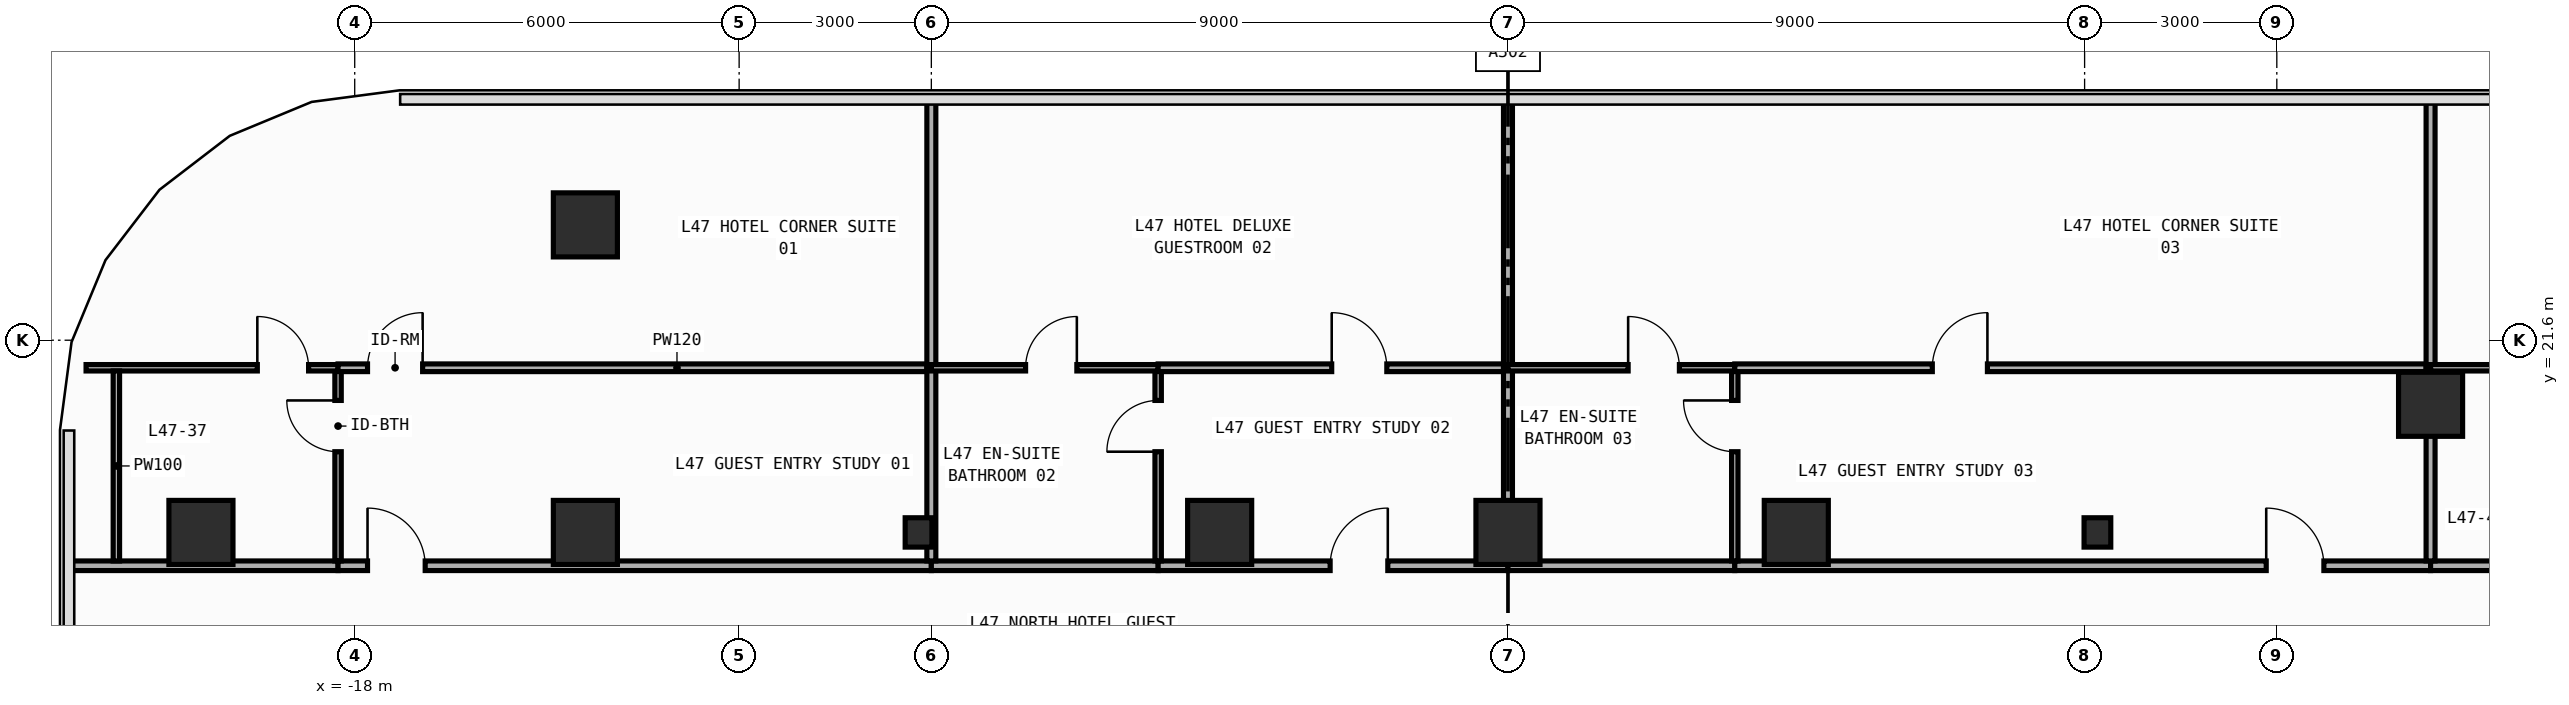
"""IFC4 building model, lengths in metres.
Left out: names, types, materials, properties, quantities, classifications, styles, units other than length and angle.
Written with IfcOpenShell. Run it as: python <this file> out.ifc"""

import sys

from ifc_helpers import new_model, si_unit, direction, frame, frame_2d, origin, origin_2d, place, context, subcontext, project, spatial, rectangle, i_section, extrude, element, fill, save


model = new_model("IFC4")
c1 = context("Model", 3, precision=1e-05, world=origin(), true_north=direction((0.0, 1.0)))
c2 = subcontext(c1, "Body", "Model", "MODEL_VIEW")
j1 = project(units=[si_unit("LENGTHUNIT", "METRE"), si_unit("PLANEANGLEUNIT", "RADIAN")], contexts=[c1])
p1 = place(None, origin())
s1 = spatial("IfcSite", under=j1, at=p1, CompositionType="ELEMENT")
p2 = place(p1, origin())
s2 = spatial("IfcBuilding", under=s1, at=p2, CompositionType="ELEMENT")
p3 = place(p2, frame((0.0, 0.0, 203.0)))
s3 = spatial("IfcBuildingStorey", under=s2, at=p3, CompositionType="ELEMENT", Elevation=203.0)
for number, where, z_axis, x_axis in (
    (1, (-9.2, 18.6, 0.0), (0.0, 0.0, 1.0), (1.0, 0.0, 0.0)),
    (2, (9.2, 18.6, 0.0), (0.0, 0.0, 1.0), (1.0, 0.0, 0.0)),
):
    element("IfcColumn", number, at=place(p3, frame(where, z_axis=z_axis, x_axis=x_axis)), inside=s3, PredefinedType="COLUMN", context=c2, shape_type="SweptSolid", body=[
        extrude(i_section(OverallWidth=0.417, OverallDepth=0.458, WebThickness=0.03, FlangeThickness=0.05, FilletRadius=0.022, at=origin_2d()), origin(), (0.0, 0.0, 1.0), 3.8),
    ])
for number, where, z_axis, x_axis in (
    (3, (-20.4, 18.6, 0.0), (0.0, 0.0, 1.0), (1.0, 0.0, 0.0)),
    (4, (-14.4, 18.6, 0.0), (0.0, 0.0, 1.0), (1.0, 0.0, 0.0)),
    (5, (-4.5, 18.6, 0.0), (0.0, 0.0, 1.0), (1.0, 0.0, 0.0)),
    (6, (0.0, 18.6, 0.0), (0.0, 0.0, 1.0), (1.0, 0.0, 0.0)),
    (7, (4.5, 18.6, 0.0), (0.0, 0.0, 1.0), (1.0, 0.0, 0.0)),
    (8, (-14.4, 23.4, 0.0), (0.0, 0.0, 1.0), (1.0, 0.0, 0.0)),
    (9, (14.4, 20.6, 0.0), (0.0, 0.0, 1.0), (1.0, 0.0, 0.0)),
):
    element("IfcColumn", number, at=place(p3, frame(where, z_axis=z_axis, x_axis=x_axis)), inside=s3, PredefinedType="COLUMN", context=c2, shape_type="SweptSolid", body=[
        extrude(rectangle(XDim=1.0, YDim=1.0, at=origin_2d()), origin(), (0.0, 0.0, 1.0), 3.8),
    ])
p4 = place(p3, frame((-22.455, 18.08, 0.0), z_axis=(0.0, 0.0, 1.0), x_axis=(1.0, 0.0, 0.0)))
e10 = element("IfcWall", 10, at=p4, inside=s3, PredefinedType="PARTITIONING", context=c2, shape_type="SweptSolid", body=[
    extrude(rectangle(XDim=4.195, YDim=0.15, at=frame_2d((2.098, 0.0))), origin(), (0.0, 0.0, 1.0), 3.54),
])
p5 = place(p3, frame((-18.26, 18.08, 0.0), z_axis=(0.0, 0.0, 1.0), x_axis=(1.0, 0.0, 0.0)))
e11 = element("IfcWall", 11, at=p5, inside=s3, PredefinedType="PARTITIONING", context=c2, shape_type="SweptSolid", body=[
    extrude(rectangle(XDim=9.26, YDim=0.15, at=frame_2d((4.63, 0.0))), origin(), (0.0, 0.0, 1.0), 3.54),
])
p6 = place(p5, frame((0.46, 0.0, 0.0)))
e12 = element("IfcOpeningElement", 12, at=p6, cuts=e11, PredefinedType="OPENING", context=c2, shape_type="SweptSolid", body=[
    extrude(rectangle(XDim=0.9, YDim=2.15, at=frame_2d((0.45, 1.075))), frame((0.0, 0.085, 0.0), z_axis=(0.0, -1.0, 0.0), x_axis=(1.0, 0.0, 0.0)), (0.0, 0.0, 1.0), 0.17),
])
p7 = place(p3, frame((-9.0, 18.08, 0.0), z_axis=(0.0, 0.0, 1.0), x_axis=(1.0, 0.0, 0.0)))
e13 = element("IfcWall", 13, at=p7, inside=s3, PredefinedType="PARTITIONING", context=c2, shape_type="SweptSolid", body=[
    extrude(rectangle(XDim=3.54, YDim=0.15, at=frame_2d((1.77, 0.0))), origin(), (0.0, 0.0, 1.0), 3.54),
])
p8 = place(p3, frame((-5.46, 18.08, 0.0), z_axis=(0.0, 0.0, 1.0), x_axis=(1.0, 0.0, 0.0)))
e14 = element("IfcWall", 14, at=p8, inside=s3, PredefinedType="PARTITIONING", context=c2, shape_type="SweptSolid", body=[
    extrude(rectangle(XDim=5.46, YDim=0.15, at=frame_2d((2.73, 0.0))), origin(), (0.0, 0.0, 1.0), 3.54),
])
p9 = place(p8, frame((2.684, 0.0, 0.0)))
e15 = element("IfcOpeningElement", 15, at=p9, cuts=e14, PredefinedType="OPENING", context=c2, shape_type="SweptSolid", body=[
    extrude(rectangle(XDim=0.9, YDim=2.15, at=frame_2d((0.45, 1.075))), frame((0.0, 0.085, 0.0), z_axis=(0.0, -1.0, 0.0), x_axis=(1.0, 0.0, 0.0)), (0.0, 0.0, 1.0), 0.17),
])
p10 = place(p3, frame((0.0, 18.08, 0.0), z_axis=(0.0, 0.0, 1.0), x_axis=(1.0, 0.0, 0.0)))
e16 = element("IfcWall", 16, at=p10, inside=s3, PredefinedType="PARTITIONING", context=c2, shape_type="SweptSolid", body=[
    extrude(rectangle(XDim=3.54, YDim=0.15, at=frame_2d((1.77, 0.0))), origin(), (0.0, 0.0, 1.0), 3.54),
])
p11 = place(p3, frame((3.54, 18.08, 0.0), z_axis=(0.0, 0.0, 1.0), x_axis=(1.0, 0.0, 0.0)))
e17 = element("IfcWall", 17, at=p11, inside=s3, PredefinedType="PARTITIONING", context=c2, shape_type="SweptSolid", body=[
    extrude(rectangle(XDim=10.86, YDim=0.15, at=frame_2d((5.43, 0.0))), origin(), (0.0, 0.0, 1.0), 3.54),
])
p12 = place(p11, frame((8.295, 0.0, 0.0)))
e18 = element("IfcOpeningElement", 18, at=p12, cuts=e17, PredefinedType="OPENING", context=c2, shape_type="SweptSolid", body=[
    extrude(rectangle(XDim=0.9, YDim=2.15, at=frame_2d((0.45, 1.075))), frame((0.0, 0.085, 0.0), z_axis=(0.0, -1.0, 0.0), x_axis=(1.0, 0.0, 0.0)), (0.0, 0.0, 1.0), 0.17),
])
p13 = place(p3, frame((14.4, 18.08, 0.0), z_axis=(0.0, 0.0, 1.0), x_axis=(1.0, 0.0, 0.0)))
e19 = element("IfcWall", 19, at=p13, inside=s3, PredefinedType="PARTITIONING", context=c2, shape_type="SweptSolid", body=[
    extrude(rectangle(XDim=3.036, YDim=0.15, at=frame_2d((1.518, 0.0))), origin(), (0.0, 0.0, 1.0), 3.54),
])
p14 = place(p3, frame((-18.26, 18.155, 0.0), z_axis=(0.0, 0.0, 1.0), x_axis=(0.0, 1.0, 0.0)))
e20 = element("IfcWall", 20, at=p14, inside=s3, PredefinedType="PARTITIONING", context=c2, shape_type="SweptSolid", body=[
    extrude(rectangle(XDim=2.965, YDim=0.1, at=frame_2d((1.482, 0.0))), origin(), (0.0, 0.0, 1.0), 3.54),
])
p15 = place(p14, frame((1.705, 0.0, 0.0)))
e21 = element("IfcOpeningElement", 21, at=p15, cuts=e20, PredefinedType="OPENING", context=c2, shape_type="SweptSolid", body=[
    extrude(rectangle(XDim=0.8, YDim=2.1, at=frame_2d((0.4, 1.05))), frame((0.0, 0.06, 0.0), z_axis=(0.0, -1.0, 0.0), x_axis=(1.0, 0.0, 0.0)), (0.0, 0.0, 1.0), 0.12),
])
p16 = place(p3, frame((-22.193, 21.17, 0.0), z_axis=(0.0, 0.0, 1.0), x_axis=(1.0, 0.0, 0.0)))
e22 = element("IfcWall", 22, at=p16, inside=s3, PredefinedType="PARTITIONING", context=c2, shape_type="SweptSolid", body=[
    extrude(rectangle(XDim=3.933, YDim=0.1, at=frame_2d((1.967, 0.0))), origin(), (0.0, 0.0, 1.0), 3.54),
])
p17 = place(p16, frame((2.673, 0.0, 0.0)))
e23 = element("IfcOpeningElement", 23, at=p17, cuts=e22, PredefinedType="OPENING", context=c2, shape_type="SweptSolid", body=[
    extrude(rectangle(XDim=0.8, YDim=2.1, at=frame_2d((0.4, 1.05))), frame((0.0, 0.06, 0.0), z_axis=(0.0, -1.0, 0.0), x_axis=(1.0, 0.0, 0.0)), (0.0, 0.0, 1.0), 0.12),
])
p18 = place(p3, frame((-18.26, 21.17, 0.0), z_axis=(0.0, 0.0, 1.0), x_axis=(1.0, 0.0, 0.0)))
e24 = element("IfcWall", 24, at=p18, inside=s3, PredefinedType="PARTITIONING", context=c2, shape_type="SweptSolid", body=[
    extrude(rectangle(XDim=9.26, YDim=0.12, at=frame_2d((4.63, 0.0))), origin(), (0.0, 0.0, 1.0), 3.54),
])
p19 = place(p18, frame((0.46, 0.0, 0.0)))
e25 = element("IfcOpeningElement", 25, at=p19, cuts=e24, PredefinedType="OPENING", context=c2, shape_type="SweptSolid", body=[
    extrude(rectangle(XDim=0.86, YDim=2.15, at=frame_2d((0.43, 1.075))), frame((0.0, 0.07, 0.0), z_axis=(0.0, -1.0, 0.0), x_axis=(1.0, 0.0, 0.0)), (0.0, 0.0, 1.0), 0.14),
])
p20 = place(p3, frame((-9.0, 18.155, 0.0), z_axis=(0.0, 0.0, 1.0), x_axis=(0.0, 1.0, 0.0)))
e26 = element("IfcWall", 26, at=p20, inside=s3, PredefinedType="PARTITIONING", context=c2, shape_type="SweptSolid", body=[
    extrude(rectangle(XDim=3.015, YDim=0.14, at=frame_2d((1.507, 0.0))), origin(), (0.0, 0.0, 1.0), 2.952),
])
p21 = place(p3, frame((-9.0, 21.17, 0.0), z_axis=(0.0, 0.0, 1.0), x_axis=(0.0, 1.0, 0.0)))
e27 = element("IfcWall", 27, at=p21, inside=s3, PredefinedType="PARTITIONING", context=c2, shape_type="SweptSolid", body=[
    extrude(rectangle(XDim=4.185, YDim=0.14, at=frame_2d((2.093, 0.0))), origin(), (0.0, 0.0, 1.0), 3.54),
])
p22 = place(p3, frame((-5.46, 18.155, 0.0), z_axis=(0.0, 0.0, 1.0), x_axis=(0.0, 1.0, 0.0)))
e28 = element("IfcWall", 28, at=p22, inside=s3, PredefinedType="PARTITIONING", context=c2, shape_type="SweptSolid", body=[
    extrude(rectangle(XDim=2.965, YDim=0.1, at=frame_2d((1.482, 0.0))), origin(), (0.0, 0.0, 1.0), 3.54),
])
p23 = place(p22, frame((1.705, 0.0, 0.0)))
e29 = element("IfcOpeningElement", 29, at=p23, cuts=e28, PredefinedType="OPENING", context=c2, shape_type="SweptSolid", body=[
    extrude(rectangle(XDim=0.8, YDim=2.1, at=frame_2d((0.4, 1.05))), frame((0.0, 0.06, 0.0), z_axis=(0.0, -1.0, 0.0), x_axis=(1.0, 0.0, 0.0)), (0.0, 0.0, 1.0), 0.12),
])
p24 = place(p3, frame((-9.0, 21.17, 0.0), z_axis=(0.0, 0.0, 1.0), x_axis=(1.0, 0.0, 0.0)))
e30 = element("IfcWall", 30, at=p24, inside=s3, PredefinedType="PARTITIONING", context=c2, shape_type="SweptSolid", body=[
    extrude(rectangle(XDim=3.54, YDim=0.1, at=frame_2d((1.77, 0.0))), origin(), (0.0, 0.0, 1.0), 3.54),
])
p25 = place(p24, frame((1.471, 0.0, 0.0)))
e31 = element("IfcOpeningElement", 31, at=p25, cuts=e30, PredefinedType="OPENING", context=c2, shape_type="SweptSolid", body=[
    extrude(rectangle(XDim=0.8, YDim=2.1, at=frame_2d((0.4, 1.05))), frame((0.0, 0.06, 0.0), z_axis=(0.0, -1.0, 0.0), x_axis=(1.0, 0.0, 0.0)), (0.0, 0.0, 1.0), 0.12),
])
p26 = place(p3, frame((-5.46, 21.17, 0.0), z_axis=(0.0, 0.0, 1.0), x_axis=(1.0, 0.0, 0.0)))
e32 = element("IfcWall", 32, at=p26, inside=s3, PredefinedType="PARTITIONING", context=c2, shape_type="SweptSolid", body=[
    extrude(rectangle(XDim=5.46, YDim=0.12, at=frame_2d((2.73, 0.0))), origin(), (0.0, 0.0, 1.0), 3.54),
])
p27 = place(p26, frame((2.709, 0.0, 0.0)))
e33 = element("IfcOpeningElement", 33, at=p27, cuts=e32, PredefinedType="OPENING", context=c2, shape_type="SweptSolid", body=[
    extrude(rectangle(XDim=0.86, YDim=2.15, at=frame_2d((0.43, 1.075))), frame((0.0, 0.07, 0.0), z_axis=(0.0, -1.0, 0.0), x_axis=(1.0, 0.0, 0.0)), (0.0, 0.0, 1.0), 0.14),
])
p28 = place(p3, frame((0.0, 18.155, 0.0), z_axis=(0.0, 0.0, 1.0), x_axis=(0.0, 1.0, 0.0)))
e34 = element("IfcWall", 34, at=p28, inside=s3, PredefinedType="PARTITIONING", context=c2, shape_type="SweptSolid", body=[
    extrude(rectangle(XDim=3.015, YDim=0.14, at=frame_2d((1.507, 0.0))), origin(), (0.0, 0.0, 1.0), 3.54),
])
p29 = place(p3, frame((0.0, 21.17, 0.0), z_axis=(0.0, 0.0, 1.0), x_axis=(0.0, 1.0, 0.0)))
e35 = element("IfcWall", 35, at=p29, inside=s3, PredefinedType="PARTITIONING", context=c2, shape_type="SweptSolid", body=[
    extrude(rectangle(XDim=4.185, YDim=0.14, at=frame_2d((2.093, 0.0))), origin(), (0.0, 0.0, 1.0), 3.54),
])
p30 = place(p3, frame((3.54, 18.155, 0.0), z_axis=(0.0, 0.0, 1.0), x_axis=(0.0, 1.0, 0.0)))
e36 = element("IfcWall", 36, at=p30, inside=s3, PredefinedType="PARTITIONING", context=c2, shape_type="SweptSolid", body=[
    extrude(rectangle(XDim=2.965, YDim=0.1, at=frame_2d((1.482, 0.0))), origin(), (0.0, 0.0, 1.0), 3.54),
])
p31 = place(p30, frame((1.705, 0.0, 0.0)))
e37 = element("IfcOpeningElement", 37, at=p31, cuts=e36, PredefinedType="OPENING", context=c2, shape_type="SweptSolid", body=[
    extrude(rectangle(XDim=0.8, YDim=2.1, at=frame_2d((0.4, 1.05))), frame((0.0, 0.06, 0.0), z_axis=(0.0, -1.0, 0.0), x_axis=(1.0, 0.0, 0.0)), (0.0, 0.0, 1.0), 0.12),
])
p32 = place(p3, frame((0.0, 21.17, 0.0), z_axis=(0.0, 0.0, 1.0), x_axis=(1.0, 0.0, 0.0)))
e38 = element("IfcWall", 38, at=p32, inside=s3, PredefinedType="PARTITIONING", context=c2, shape_type="SweptSolid", body=[
    extrude(rectangle(XDim=3.54, YDim=0.1, at=frame_2d((1.77, 0.0))), origin(), (0.0, 0.0, 1.0), 3.54),
])
p33 = place(p32, frame((1.875, 0.0, 0.0)))
e39 = element("IfcOpeningElement", 39, at=p33, cuts=e38, PredefinedType="OPENING", context=c2, shape_type="SweptSolid", body=[
    extrude(rectangle(XDim=0.8, YDim=2.1, at=frame_2d((0.4, 1.05))), frame((0.0, 0.06, 0.0), z_axis=(0.0, -1.0, 0.0), x_axis=(1.0, 0.0, 0.0)), (0.0, 0.0, 1.0), 0.12),
])
p34 = place(p3, frame((3.54, 21.17, 0.0), z_axis=(0.0, 0.0, 1.0), x_axis=(1.0, 0.0, 0.0)))
e40 = element("IfcWall", 40, at=p34, inside=s3, PredefinedType="PARTITIONING", context=c2, shape_type="SweptSolid", body=[
    extrude(rectangle(XDim=10.86, YDim=0.12, at=frame_2d((5.43, 0.0))), origin(), (0.0, 0.0, 1.0), 3.54),
])
p35 = place(p34, frame((3.083, 0.0, 0.0)))
e41 = element("IfcOpeningElement", 41, at=p35, cuts=e40, PredefinedType="OPENING", context=c2, shape_type="SweptSolid", body=[
    extrude(rectangle(XDim=0.86, YDim=2.15, at=frame_2d((0.43, 1.075))), frame((0.0, 0.07, 0.0), z_axis=(0.0, -1.0, 0.0), x_axis=(1.0, 0.0, 0.0)), (0.0, 0.0, 1.0), 0.14),
])
p36 = place(p3, frame((14.4, 18.155, 0.0), z_axis=(0.0, 0.0, 1.0), x_axis=(0.0, 1.0, 0.0)))
e42 = element("IfcWall", 42, at=p36, inside=s3, PredefinedType="PARTITIONING", context=c2, shape_type="SweptSolid", body=[
    extrude(rectangle(XDim=3.015, YDim=0.14, at=frame_2d((1.507, 0.0))), origin(), (0.0, 0.0, 1.0), 2.952),
])
p37 = place(p3, frame((14.4, 21.17, 0.0), z_axis=(0.0, 0.0, 1.0), x_axis=(0.0, 1.0, 0.0)))
e43 = element("IfcWall", 43, at=p37, inside=s3, PredefinedType="PARTITIONING", context=c2, shape_type="SweptSolid", body=[
    extrude(rectangle(XDim=4.185, YDim=0.14, at=frame_2d((2.093, 0.0))), origin(), (0.0, 0.0, 1.0), 3.54),
])
p38 = place(p3, frame((14.4, 21.17, 0.0), z_axis=(0.0, 0.0, 1.0), x_axis=(1.0, 0.0, 0.0)))
e44 = element("IfcWall", 44, at=p38, inside=s3, PredefinedType="PARTITIONING", context=c2, shape_type="SweptSolid", body=[
    extrude(rectangle(XDim=3.036, YDim=0.1, at=frame_2d((1.518, 0.0))), origin(), (0.0, 0.0, 1.0), 3.54),
])
p39 = place(p38, frame((1.776, 0.0, 0.0)))
e45 = element("IfcOpeningElement", 45, at=p39, cuts=e44, PredefinedType="OPENING", context=c2, shape_type="SweptSolid", body=[
    extrude(rectangle(XDim=0.8, YDim=2.1, at=frame_2d((0.4, 1.05))), frame((0.0, 0.06, 0.0), z_axis=(0.0, -1.0, 0.0), x_axis=(1.0, 0.0, 0.0)), (0.0, 0.0, 1.0), 0.12),
])
p40 = place(p3, frame((-21.72, 18.155, 0.0), z_axis=(0.0, 0.0, 1.0), x_axis=(0.0, 1.0, 0.0)))
e46 = element("IfcWall", 46, at=p40, inside=s3, PredefinedType="PARTITIONING", context=c2, shape_type="SweptSolid", body=[
    extrude(rectangle(XDim=2.965, YDim=0.1, at=frame_2d((1.482, 0.0))), origin(), (0.0, 0.0, 1.0), 3.54),
])
p41 = place(p6, origin())
e47 = element("IfcDoor", 47, at=p41, inside=s3, OperationType="SINGLE_SWING_LEFT", PredefinedType="DOOR", context=c2, shape_type="SweptSolid", body=[
    extrude(rectangle(XDim=0.9, YDim=2.15, at=frame_2d((0.45, 1.075))), frame((0.0, 0.025, 0.0), z_axis=(0.0, -1.0, 0.0), x_axis=(1.0, 0.0, 0.0)), (0.0, 0.0, 1.0), 0.05),
])
fill(e12, e47)
p42 = place(p9, origin())
e48 = element("IfcDoor", 48, at=p42, inside=s3, OperationType="SINGLE_SWING_RIGHT", PredefinedType="DOOR", context=c2, shape_type="SweptSolid", body=[
    extrude(rectangle(XDim=0.9, YDim=2.15, at=frame_2d((0.45, 1.075))), frame((0.0, 0.025, 0.0), z_axis=(0.0, -1.0, 0.0), x_axis=(1.0, 0.0, 0.0)), (0.0, 0.0, 1.0), 0.05),
])
fill(e15, e48)
p43 = place(p12, origin())
e49 = element("IfcDoor", 49, at=p43, inside=s3, OperationType="SINGLE_SWING_LEFT", PredefinedType="DOOR", context=c2, shape_type="SweptSolid", body=[
    extrude(rectangle(XDim=0.9, YDim=2.15, at=frame_2d((0.45, 1.075))), frame((0.0, 0.025, 0.0), z_axis=(0.0, -1.0, 0.0), x_axis=(1.0, 0.0, 0.0)), (0.0, 0.0, 1.0), 0.05),
])
fill(e18, e49)
p44 = place(p15, origin())
e50 = element("IfcDoor", 50, at=p44, inside=s3, OperationType="SINGLE_SWING_RIGHT", PredefinedType="DOOR", context=c2, shape_type="SweptSolid", body=[
    extrude(rectangle(XDim=0.8, YDim=2.1, at=frame_2d((0.4, 1.05))), frame((0.0, 0.025, 0.0), z_axis=(0.0, -1.0, 0.0), x_axis=(1.0, 0.0, 0.0)), (0.0, 0.0, 1.0), 0.05),
])
fill(e21, e50)
p45 = place(p17, origin())
e51 = element("IfcDoor", 51, at=p45, inside=s3, OperationType="SINGLE_SWING_LEFT", PredefinedType="DOOR", context=c2, shape_type="SweptSolid", body=[
    extrude(rectangle(XDim=0.8, YDim=2.1, at=frame_2d((0.4, 1.05))), frame((0.0, 0.025, 0.0), z_axis=(0.0, -1.0, 0.0), x_axis=(1.0, 0.0, 0.0)), (0.0, 0.0, 1.0), 0.05),
])
fill(e23, e51)
p46 = place(p19, origin())
e52 = element("IfcDoor", 52, at=p46, inside=s3, OperationType="SINGLE_SWING_RIGHT", PredefinedType="DOOR", context=c2, shape_type="SweptSolid", body=[
    extrude(rectangle(XDim=0.86, YDim=2.15, at=frame_2d((0.43, 1.075))), frame((0.0, 0.025, 0.0), z_axis=(0.0, -1.0, 0.0), x_axis=(1.0, 0.0, 0.0)), (0.0, 0.0, 1.0), 0.05),
])
fill(e25, e52)
p47 = place(p23, origin())
e53 = element("IfcDoor", 53, at=p47, inside=s3, OperationType="SINGLE_SWING_LEFT", PredefinedType="DOOR", context=c2, shape_type="SweptSolid", body=[
    extrude(rectangle(XDim=0.8, YDim=2.1, at=frame_2d((0.4, 1.05))), frame((0.0, 0.025, 0.0), z_axis=(0.0, -1.0, 0.0), x_axis=(1.0, 0.0, 0.0)), (0.0, 0.0, 1.0), 0.05),
])
fill(e29, e53)
p48 = place(p25, origin())
e54 = element("IfcDoor", 54, at=p48, inside=s3, OperationType="SINGLE_SWING_RIGHT", PredefinedType="DOOR", context=c2, shape_type="SweptSolid", body=[
    extrude(rectangle(XDim=0.8, YDim=2.1, at=frame_2d((0.4, 1.05))), frame((0.0, 0.025, 0.0), z_axis=(0.0, -1.0, 0.0), x_axis=(1.0, 0.0, 0.0)), (0.0, 0.0, 1.0), 0.05),
])
fill(e31, e54)
p49 = place(p27, origin())
e55 = element("IfcDoor", 55, at=p49, inside=s3, OperationType="SINGLE_SWING_LEFT", PredefinedType="DOOR", context=c2, shape_type="SweptSolid", body=[
    extrude(rectangle(XDim=0.86, YDim=2.15, at=frame_2d((0.43, 1.075))), frame((0.0, 0.025, 0.0), z_axis=(0.0, -1.0, 0.0), x_axis=(1.0, 0.0, 0.0)), (0.0, 0.0, 1.0), 0.05),
])
fill(e33, e55)
p50 = place(p31, origin())
e56 = element("IfcDoor", 56, at=p50, inside=s3, OperationType="SINGLE_SWING_RIGHT", PredefinedType="DOOR", context=c2, shape_type="SweptSolid", body=[
    extrude(rectangle(XDim=0.8, YDim=2.1, at=frame_2d((0.4, 1.05))), frame((0.0, 0.025, 0.0), z_axis=(0.0, -1.0, 0.0), x_axis=(1.0, 0.0, 0.0)), (0.0, 0.0, 1.0), 0.05),
])
fill(e37, e56)
p51 = place(p33, origin())
e57 = element("IfcDoor", 57, at=p51, inside=s3, OperationType="SINGLE_SWING_LEFT", PredefinedType="DOOR", context=c2, shape_type="SweptSolid", body=[
    extrude(rectangle(XDim=0.8, YDim=2.1, at=frame_2d((0.4, 1.05))), frame((0.0, 0.025, 0.0), z_axis=(0.0, -1.0, 0.0), x_axis=(1.0, 0.0, 0.0)), (0.0, 0.0, 1.0), 0.05),
])
fill(e39, e57)
p52 = place(p35, origin())
e58 = element("IfcDoor", 58, at=p52, inside=s3, OperationType="SINGLE_SWING_RIGHT", PredefinedType="DOOR", context=c2, shape_type="SweptSolid", body=[
    extrude(rectangle(XDim=0.86, YDim=2.15, at=frame_2d((0.43, 1.075))), frame((0.0, 0.025, 0.0), z_axis=(0.0, -1.0, 0.0), x_axis=(1.0, 0.0, 0.0)), (0.0, 0.0, 1.0), 0.05),
])
fill(e41, e58)
save(model, sys.argv[1])
